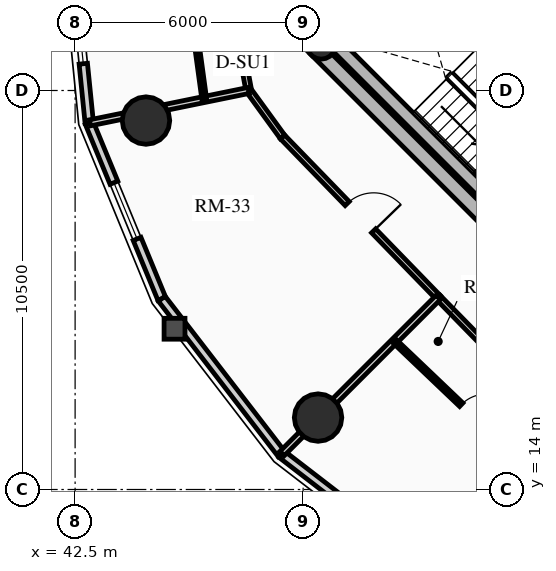
"""IFC4 building model, lengths in metres.
Left out: names, types, materials, properties, quantities, classifications, styles, units other than length and angle.
Written with IfcOpenShell. Run it as: python <this file> out.ifc"""

import sys

from ifc_helpers import new_model, si_unit, direction, frame, frame_2d, origin, origin_2d, place, context, subcontext, project, spatial, rectangle, circle, hollow_circle, extrude, source, transform, mapped, element, fill, save


model = new_model("IFC4")
c1 = context("Model", 3, precision=1e-05, world=origin(), true_north=direction((0.0, 1.0)))
c2 = subcontext(c1, "Body", "Model", "MODEL_VIEW")
j1 = project(units=[si_unit("LENGTHUNIT", "METRE"), si_unit("PLANEANGLEUNIT", "RADIAN")], contexts=[c1])
p1 = place(None, origin())
s1 = spatial("IfcSite", under=j1, at=p1, CompositionType="ELEMENT")
p2 = place(p1, origin())
s2 = spatial("IfcBuilding", under=s1, at=p2, CompositionType="ELEMENT")
p3 = place(p2, frame((0.0, 0.0, 174.88)))
s3 = spatial("IfcBuildingStorey", under=s2, at=p3, CompositionType="ELEMENT", Elevation=174.88)
p4 = place(p3, frame((58.702, 15.732, 0.0), z_axis=(0.0, 0.0, 1.0), x_axis=(-0.707106781187, 0.707106781187, 0.0)))
e1 = element("IfcWall", 1, at=p4, inside=s3, PredefinedType="SHEAR", context=c2, shape_type="SweptSolid", body=[
    extrude(rectangle(XDim=14.1, YDim=0.4, at=frame_2d((7.05, 0.0))), origin(), (0.0, 0.0, 1.0), 2.91),
])
p5 = place(p3, frame((48.873, 25.561, 0.0), z_axis=(0.0, 0.0, 1.0), x_axis=(0.707106781187, 0.707106781187, 0.0)))
e2 = element("IfcWall", 2, at=p5, inside=s3, PredefinedType="SHEAR", context=c2, shape_type="SweptSolid", body=[
    extrude(rectangle(XDim=10.7, YDim=0.4, at=frame_2d((5.35, 0.0))), origin(), (0.0, 0.0, 1.0), 2.91),
])
m1 = source(origin(), c2, "Body", "SweptSolid", [
    extrude(rectangle(XDim=1.5, YDim=2.02, at=frame_2d((0.75, 1.01))), frame((0.0, 0.21, 0.0), z_axis=(0.0, -1.0, 0.0), x_axis=(1.0, 0.0, 0.0)), (0.0, 0.0, 1.0), 0.42),
])
p6 = place(p5, frame((4.6, 0.0, 0.0)))
e3 = element("IfcOpeningElement", 3, at=p6, cuts=e2, PredefinedType="OPENING", context=c2, shape_type="MappedRepresentation", body=[
    mapped(m1, transform((0.0, 0.0, 0.0), x_axis=(1.0, 0.0, 0.0), y_axis=(0.0, 1.0, 0.0), z_axis=(0.0, 0.0, 1.0), scale=1.0)),
])
p7 = place(p3, frame((61.06, 18.373, 0.0), z_axis=(0.0, 0.0, 1.0), x_axis=(-0.707106781187, 0.707106781187, 0.0)))
e4 = element("IfcWall", 4, at=p7, inside=s3, PredefinedType="SHEAR", context=c2, shape_type="SweptSolid", body=[
    extrude(rectangle(XDim=13.7, YDim=0.35, at=frame_2d((6.85, 0.0))), origin(), (0.0, 0.0, 1.0), 2.91),
])
m2 = source(origin(), c2, "Body", "SweptSolid", [
    extrude(rectangle(XDim=1.1, YDim=2.015, at=frame_2d((0.55, 1.007))), frame((0.0, 0.185, 0.0), z_axis=(0.0, -1.0, 0.0), x_axis=(1.0, 0.0, 0.0)), (0.0, 0.0, 1.0), 0.37),
])
p8 = place(p7, frame((4.85, 0.0, 0.0)))
e5 = element("IfcOpeningElement", 5, at=p8, cuts=e4, PredefinedType="OPENING", context=c2, shape_type="MappedRepresentation", body=[
    mapped(m2, transform((0.0, 0.0, 0.0), x_axis=(1.0, 0.0, 0.0), y_axis=(0.0, 1.0, 0.0), z_axis=(0.0, 0.0, 1.0), scale=1.0)),
])
p9 = place(p7, frame((0.625, 0.0, 0.0)))
e6 = element("IfcOpeningElement", 6, at=p9, cuts=e4, PredefinedType="OPENING", context=c2, shape_type="MappedRepresentation", body=[
    mapped(m2, transform((0.0, 0.0, 0.0), x_axis=(1.0, 0.0, 0.0), y_axis=(0.0, 1.0, 0.0), z_axis=(0.0, 0.0, 1.0), scale=1.0)),
])
p10 = place(p7, frame((2.625, 0.0, 0.0)))
e7 = element("IfcOpeningElement", 7, at=p10, cuts=e4, PredefinedType="OPENING", context=c2, shape_type="MappedRepresentation", body=[
    mapped(m2, transform((0.0, 0.0, 0.0), x_axis=(1.0, 0.0, 0.0), y_axis=(0.0, 1.0, 0.0), z_axis=(0.0, 0.0, 1.0), scale=1.0)),
])
m3 = source(origin(), c2, "Body", "SweptSolid", [
    extrude(rectangle(XDim=1.15, YDim=2.02, at=frame_2d((0.575, 1.01))), frame((0.0, 0.185, 0.0), z_axis=(0.0, -1.0, 0.0), x_axis=(1.0, 0.0, 0.0)), (0.0, 0.0, 1.0), 0.37),
])
p11 = place(p7, frame((7.27, 0.0, 0.0)))
e8 = element("IfcOpeningElement", 8, at=p11, cuts=e4, PredefinedType="OPENING", context=c2, shape_type="MappedRepresentation", body=[
    mapped(m3, transform((0.0, 0.0, 0.0), x_axis=(1.0, 0.0, 0.0), y_axis=(0.0, 1.0, 0.0), z_axis=(0.0, 0.0, 1.0), scale=1.0)),
])
p12 = place(p3, frame((53.922, 21.141, 0.0), z_axis=(0.0, 0.0, 1.0), x_axis=(-0.707106781187, 0.707106781187, 0.0)))
e9 = element("IfcWall", 9, at=p12, inside=s3, PredefinedType="SHEAR", context=c2, shape_type="SweptSolid", body=[
    extrude(rectangle(XDim=6.695, YDim=0.35, at=frame_2d((3.348, 0.0))), origin(), (0.0, 0.0, 1.0), 2.91),
])
p13 = place(p3, frame((48.976, 25.706, 0.0), z_axis=(0.0, 0.0, 1.0), x_axis=(0.707106781187, 0.707106781187, 0.0)))
e10 = element("IfcColumn", 10, at=p13, inside=s3, PredefinedType="COLUMN", context=c2, shape_type="SweptSolid", body=[
    extrude(hollow_circle(Radius=0.38, WallThickness=0.032, at=origin_2d()), origin(), (0.0, 0.0, 1.0), 2.91),
])
for number, where, z_axis, x_axis in (
    (11, (44.365, 23.709, 0.0), (0.0, 0.0, 1.0), (1.0, 0.0, 0.0)),
    (12, (48.893, 15.893, 0.0), (0.0, 0.0, 1.0), (1.0, 0.0, 0.0)),
):
    element("IfcColumn", number, at=place(p3, frame(where, z_axis=z_axis, x_axis=x_axis)), inside=s3, PredefinedType="USERDEFINED", context=c2, shape_type="SweptSolid", body=[
        extrude(circle(Radius=0.625, at=origin_2d()), origin(), (0.0, 0.0, 1.0), 2.91),
    ])
p14 = place(p3, frame((42.873, 23.646, 0.0), z_axis=(0.0, 0.0, 1.0), x_axis=(-0.100438356004, 0.994943283129, 0.0)))
e13 = element("IfcWall", 13, at=p14, inside=s3, PredefinedType="SOLIDWALL", context=c2, shape_type="SweptSolid", body=[
    extrude(rectangle(XDim=4.733, YDim=0.22, at=frame_2d((2.366, 0.0))), origin(), (0.0, 0.0, 1.0), 2.245),
])
m4 = source(origin(), c2, "Body", "SweptSolid", [
    extrude(rectangle(XDim=1.6, YDim=1.3, at=frame_2d((0.8, 0.65))), frame((0.0, 0.12, 0.0), z_axis=(0.0, -1.0, 0.0), x_axis=(1.0, 0.0, 0.0)), (0.0, 0.0, 1.0), 0.24),
])
p15 = place(p14, frame((1.566, 0.0, 0.65)))
e14 = element("IfcOpeningElement", 14, at=p15, cuts=e13, PredefinedType="OPENING", context=c2, shape_type="MappedRepresentation", body=[
    mapped(m4, transform((0.0, 0.0, 0.0), x_axis=(1.0, 0.0, 0.0), y_axis=(0.0, 1.0, 0.0), z_axis=(0.0, 0.0, 1.0), scale=1.0)),
])
p16 = place(p3, frame((44.78, 19.021, 0.0), z_axis=(0.0, 0.0, 1.0), x_axis=(-0.381196434348, 0.924494066201, 0.0)))
e15 = element("IfcWall", 15, at=p16, inside=s3, PredefinedType="SOLIDWALL", context=c2, shape_type="SweptSolid", body=[
    extrude(rectangle(XDim=5.003, YDim=0.22, at=frame_2d((2.501, 0.0))), origin(), (0.0, 0.0, 1.0), 2.245),
])
p17 = place(p16, frame((1.702, 0.0, 0.65)))
e16 = element("IfcOpeningElement", 16, at=p17, cuts=e15, PredefinedType="OPENING", context=c2, shape_type="MappedRepresentation", body=[
    mapped(m4, transform((0.0, 0.0, 0.0), x_axis=(1.0, 0.0, 0.0), y_axis=(0.0, 1.0, 0.0), z_axis=(0.0, 0.0, 1.0), scale=1.0)),
])
p18 = place(p3, frame((47.932, 14.932, 0.0), z_axis=(0.0, 0.0, 1.0), x_axis=(-0.610569654715, 0.791962560189, 0.0)))
e17 = element("IfcWall", 17, at=p18, inside=s3, PredefinedType="SOLIDWALL", context=c2, shape_type="SweptSolid", body=[
    extrude(rectangle(XDim=5.163, YDim=0.22, at=frame_2d((2.582, 0.0))), origin(), (0.0, 0.0, 1.0), 2.245),
])
p19 = place(p3, frame((52.021, 11.78, 0.0), z_axis=(0.0, 0.0, 1.0), x_axis=(-0.791962560189, 0.610569654715, 0.0)))
e18 = element("IfcWall", 18, at=p19, inside=s3, PredefinedType="SOLIDWALL", context=c2, shape_type="SweptSolid", body=[
    extrude(rectangle(XDim=5.163, YDim=0.22, at=frame_2d((2.582, 0.0))), origin(), (0.0, 0.0, 1.0), 2.245),
])
p20 = place(p19, frame((1.782, 0.0, 0.65)))
e19 = element("IfcOpeningElement", 19, at=p20, cuts=e18, PredefinedType="OPENING", context=c2, shape_type="MappedRepresentation", body=[
    mapped(m4, transform((0.0, 0.0, 0.0), x_axis=(1.0, 0.0, 0.0), y_axis=(0.0, 1.0, 0.0), z_axis=(0.0, 0.0, 1.0), scale=1.0)),
])
p21 = place(p3, frame((46.822, 25.836, 0.0), z_axis=(0.0, 0.0, 1.0), x_axis=(0.182115036249, -0.983277231289, 0.0)))
e20 = element("IfcWall", 20, at=p21, inside=s3, PredefinedType="PARTITIONING", context=c2, shape_type="SweptSolid", body=[
    extrude(rectangle(XDim=1.357, YDim=0.15, at=frame_2d((0.678, 0.0))), origin(), (0.0, 0.0, 1.0), 2.245),
])
p22 = place(p3, frame((47.069, 24.502, 0.0), z_axis=(0.0, 0.0, 1.0), x_axis=(0.587577436866, -0.809167940347, 0.0)))
e21 = element("IfcWall", 21, at=p22, inside=s3, PredefinedType="PARTITIONING", context=c2, shape_type="SweptSolid", body=[
    extrude(rectangle(XDim=1.515, YDim=0.15, at=frame_2d((0.757, 0.0))), origin(), (0.0, 0.0, 1.0), 2.245),
])
p23 = place(p3, frame((47.959, 23.277, 0.0), z_axis=(0.0, 0.0, 1.0), x_axis=(0.696422573496, -0.717631938479, 0.0)))
e22 = element("IfcWall", 22, at=p23, inside=s3, PredefinedType="PARTITIONING", context=c2, shape_type="SweptSolid", body=[
    extrude(rectangle(XDim=5.882, YDim=0.15, at=frame_2d((2.941, 0.0))), origin(), (0.0, 0.0, 1.0), 2.675),
])
m5 = source(origin(), c2, "Body", "SweptSolid", [
    extrude(rectangle(XDim=1.0, YDim=2.015, at=frame_2d((0.5, 1.007))), frame((0.0, 0.085, 0.0), z_axis=(0.0, -1.0, 0.0), x_axis=(1.0, 0.0, 0.0)), (0.0, 0.0, 1.0), 0.17),
])
p24 = place(p23, frame((2.441, 0.0, 0.0)))
e23 = element("IfcOpeningElement", 23, at=p24, cuts=e22, PredefinedType="OPENING", context=c2, shape_type="MappedRepresentation", body=[
    mapped(m5, transform((0.0, 0.0, 0.0), x_axis=(1.0, 0.0, 0.0), y_axis=(0.0, 1.0, 0.0), z_axis=(0.0, 0.0, 1.0), scale=1.0)),
])
p25 = place(p3, frame((52.055, 19.055, 0.0), z_axis=(0.0, 0.0, 1.0), x_axis=(0.699249850691, -0.714877364524, 0.0)))
e24 = element("IfcWall", 24, at=p25, inside=s3, PredefinedType="PARTITIONING", context=c2, shape_type="SweptSolid", body=[
    extrude(rectangle(XDim=5.999, YDim=0.15, at=frame_2d((3.0, 0.0))), origin(), (0.0, 0.0, 1.0), 2.245),
])
p26 = place(p3, frame((47.069, 24.502, 0.0), z_axis=(0.0, 0.0, 1.0), x_axis=(-0.979772902724, -0.200112616012, 0.0)))
e25 = element("IfcWall", 25, at=p26, inside=s3, PredefinedType="PARTITIONING", context=c2, shape_type="SweptSolid", body=[
    extrude(rectangle(XDim=4.263, YDim=0.16, at=frame_2d((2.131, 0.0))), origin(), (0.0, 0.0, 1.0), 2.245),
])
p27 = place(p3, frame((52.055, 19.055, 0.0), z_axis=(0.0, 0.0, 1.0), x_axis=(-0.707106781187, -0.707106781187, 0.0)))
e26 = element("IfcWall", 26, at=p27, inside=s3, PredefinedType="PARTITIONING", context=c2, shape_type="SweptSolid", body=[
    extrude(rectangle(XDim=5.811, YDim=0.16, at=frame_2d((2.906, 0.0))), origin(), (0.0, 0.0, 1.0), 2.245),
])
p28 = place(p3, frame((45.588, 26.541, 0.0), z_axis=(0.0, 0.0, 1.0), x_axis=(0.135321759641, -0.990801706381, 0.0)))
e27 = element("IfcWall", 27, at=p28, inside=s3, PredefinedType="PARTITIONING", context=c2, shape_type="SweptSolid", body=[
    extrude(rectangle(XDim=2.299, YDim=0.125, at=frame_2d((1.149, 0.0))), origin(), (0.0, 0.0, 1.0), 2.245),
])
p29 = place(p3, frame((50.905, 17.905, 0.0), z_axis=(0.0, 0.0, 1.0), x_axis=(0.723816902075, -0.689992095803, 0.0)))
e28 = element("IfcWall", 28, at=p29, inside=s3, PredefinedType="PARTITIONING", context=c2, shape_type="SweptSolid", body=[
    extrude(rectangle(XDim=5.753, YDim=0.125, at=frame_2d((2.876, 0.0))), origin(), (0.0, 0.0, 1.0), 2.245),
])
m6 = source(origin(), c2, "Body", "SweptSolid", [
    extrude(rectangle(XDim=0.9, YDim=2.005, at=frame_2d((0.45, 1.002))), frame((0.0, 0.073, 0.0), z_axis=(0.0, -1.0, 0.0), x_axis=(1.0, 0.0, 0.0)), (0.0, 0.0, 1.0), 0.145),
])
p30 = place(p29, frame((2.426, 0.0, 0.0)))
e29 = element("IfcOpeningElement", 29, at=p30, cuts=e28, PredefinedType="OPENING", context=c2, shape_type="MappedRepresentation", body=[
    mapped(m6, transform((0.0, 0.0, 0.0), x_axis=(1.0, 0.0, 0.0), y_axis=(0.0, 1.0, 0.0), z_axis=(0.0, 0.0, 1.0), scale=1.0)),
])
m7 = source(origin(), c2, "Body", "SweptSolid", [
    extrude(rectangle(XDim=1.6, YDim=1.3, at=frame_2d((0.8, 0.65))), frame((0.0, 0.03, 0.0), z_axis=(0.0, -1.0, 0.0), x_axis=(1.0, 0.0, 0.0)), (0.0, 0.0, 1.0), 0.06),
])
p31 = place(p15, origin())
e30 = element("IfcWindow", 30, at=p31, inside=s3, PartitioningType="SINGLE_PANEL", PredefinedType="WINDOW", context=c2, shape_type="MappedRepresentation", body=[
    mapped(m7, transform((0.0, 0.0, 0.0), x_axis=(1.0, 0.0, 0.0), y_axis=(0.0, 1.0, 0.0), z_axis=(0.0, 0.0, 1.0), scale=1.0)),
])
fill(e14, e30)
p32 = place(p17, origin())
e31 = element("IfcWindow", 31, at=p32, inside=s3, PartitioningType="SINGLE_PANEL", PredefinedType="WINDOW", context=c2, shape_type="MappedRepresentation", body=[
    mapped(m7, transform((0.0, 0.0, 0.0), x_axis=(1.0, 0.0, 0.0), y_axis=(0.0, 1.0, 0.0), z_axis=(0.0, 0.0, 1.0), scale=1.0)),
])
fill(e16, e31)
m8 = source(origin(), c2, "Body", "SweptSolid", [
    extrude(rectangle(XDim=1.0, YDim=2.015, at=frame_2d((0.5, 1.007))), frame((0.0, 0.025, 0.0), z_axis=(0.0, -1.0, 0.0), x_axis=(1.0, 0.0, 0.0)), (0.0, 0.0, 1.0), 0.05),
])
p33 = place(p24, origin())
e32 = element("IfcDoor", 32, at=p33, inside=s3, OperationType="SINGLE_SWING_RIGHT", PredefinedType="DOOR", context=c2, shape_type="MappedRepresentation", body=[
    mapped(m8, transform((0.0, 0.0, 0.0), x_axis=(1.0, 0.0, 0.0), y_axis=(0.0, 1.0, 0.0), z_axis=(0.0, 0.0, 1.0), scale=1.0)),
])
fill(e23, e32)
m9 = source(origin(), c2, "Body", "SweptSolid", [
    extrude(rectangle(XDim=0.9, YDim=2.005, at=frame_2d((0.45, 1.002))), frame((0.0, 0.025, 0.0), z_axis=(0.0, -1.0, 0.0), x_axis=(1.0, 0.0, 0.0)), (0.0, 0.0, 1.0), 0.05),
])
p34 = place(p30, origin())
e33 = element("IfcDoor", 33, at=p34, inside=s3, OperationType="SINGLE_SWING_RIGHT", PredefinedType="DOOR", context=c2, shape_type="MappedRepresentation", body=[
    mapped(m9, transform((0.0, 0.0, 0.0), x_axis=(1.0, 0.0, 0.0), y_axis=(0.0, 1.0, 0.0), z_axis=(0.0, 0.0, 1.0), scale=1.0)),
])
fill(e29, e33)
save(model, sys.argv[1])
